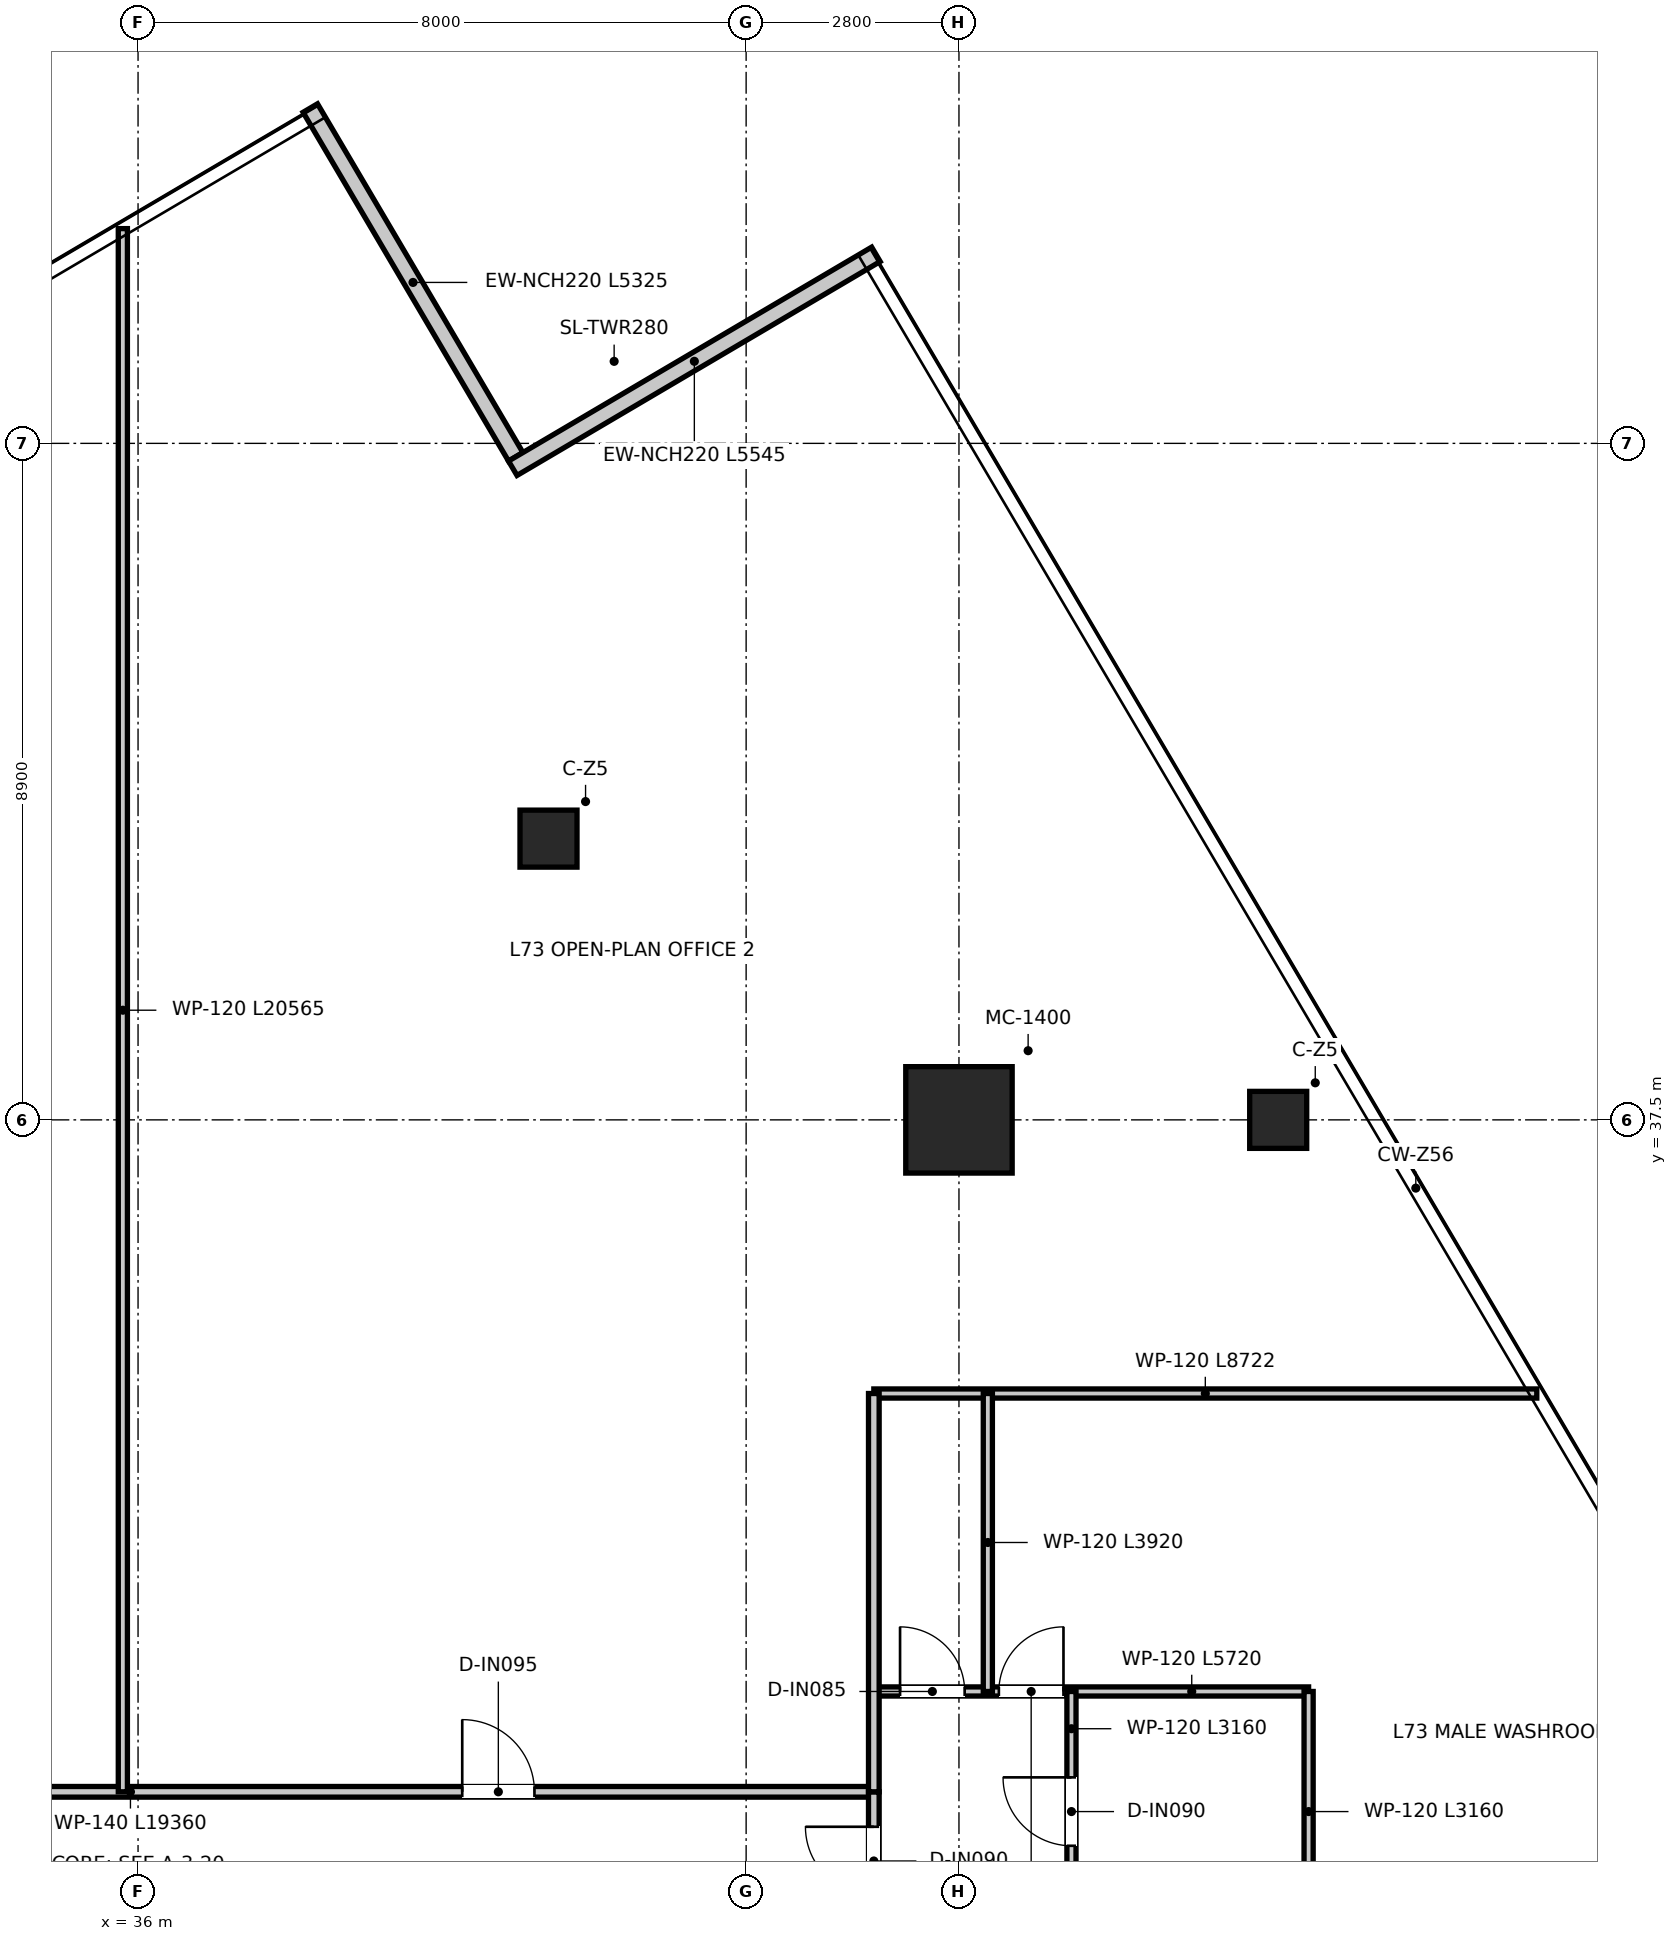
"""IFC4 building model, lengths in metres.
Left out: names, types, materials, properties, quantities, classifications, styles, units other than length and angle.
Written with IfcOpenShell. Run it as: python <this file> out.ifc"""

import sys

from ifc_helpers import new_model, si_unit, direction, frame, frame_2d, origin, origin_2d, place, context, subcontext, project, spatial, rectangle, extrude, source, transform, mapped, element, fill, save


model = new_model("IFC4")
c1 = context("Model", 3, precision=1e-05, world=origin(), true_north=direction((0.0, 1.0)))
c2 = subcontext(c1, "Body", "Model", "MODEL_VIEW")
j1 = project(units=[si_unit("LENGTHUNIT", "METRE"), si_unit("PLANEANGLEUNIT", "RADIAN")], contexts=[c1])
p1 = place(None, origin())
s1 = spatial("IfcSite", under=j1, at=p1, CompositionType="ELEMENT")
p2 = place(p1, origin())
s2 = spatial("IfcBuilding", under=s1, at=p2, CompositionType="ELEMENT")
p3 = place(p2, frame((0.0, 0.0, 299.0)))
s3 = spatial("IfcBuildingStorey", under=s2, at=p3, CompositionType="ELEMENT", Elevation=299.0)
m1 = source(origin(), c2, "Body", "SweptSolid", [
    extrude(rectangle(XDim=1.4, YDim=1.4, at=origin_2d()), origin(), (0.0, 0.0, 1.0), 3.95),
])
p4 = place(p3, frame((46.8, 37.5, 0.0), z_axis=(0.0, 0.0, 1.0), x_axis=(1.0, 0.0, 0.0)))
e1 = element("IfcColumn", 1, at=p4, inside=s3, PredefinedType="USERDEFINED", context=c2, shape_type="MappedRepresentation", body=[
    mapped(m1, transform((0.0, 0.0, 0.0), x_axis=(1.0, 0.0, 0.0), y_axis=(0.0, 1.0, 0.0), z_axis=(0.0, 0.0, 1.0), scale=1.0)),
])
m2 = source(origin(), c2, "Body", "SweptSolid", [
    extrude(rectangle(XDim=0.75, YDim=0.75, at=origin_2d()), origin(), (0.0, 0.0, 1.0), 3.95),
])
for number, where, z_axis, x_axis in (
    (2, (41.4, 41.2, 0.0), (0.0, 0.0, 1.0), (1.0, 0.0, 0.0)),
    (3, (51.0, 37.5, 0.0), (0.0, 0.0, 1.0), (1.0, 0.0, 0.0)),
):
    element("IfcColumn", number, at=place(p3, frame(where, z_axis=z_axis, x_axis=x_axis)), inside=s3, PredefinedType="COLUMN", context=c2, shape_type="MappedRepresentation", body=[
        mapped(m2, transform((0.0, 0.0, 0.0), x_axis=(1.0, 0.0, 0.0), y_axis=(0.0, 1.0, 0.0), z_axis=(0.0, 0.0, 1.0), scale=1.0)),
    ])
p5 = place(p3, frame((40.969, 46.223, 0.0), z_axis=(0.0, 0.0, 1.0), x_axis=(-0.507540984104, 0.861627616465, 0.0)))
e4 = element("IfcWall", 4, at=p5, inside=s3, PredefinedType="ELEMENTEDWALL", context=c2, shape_type="SweptSolid", body=[
    extrude(rectangle(XDim=5.325, YDim=0.22, at=frame_2d((2.663, 0.0))), origin(), (0.0, 0.0, 1.0), 3.67),
])
p6 = place(p3, frame((45.708, 48.887, 0.0), z_axis=(0.0, 0.0, 1.0), x_axis=(-0.861640923955, -0.507518391948, 0.0)))
e5 = element("IfcWall", 5, at=p6, inside=s3, PredefinedType="ELEMENTEDWALL", context=c2, shape_type="SweptSolid", body=[
    extrude(rectangle(XDim=5.545, YDim=0.22, at=frame_2d((2.772, 0.0))), origin(), (0.0, 0.0, 1.0), 3.67),
])
p7 = place(p3, frame((26.32, 28.66, 0.0), z_axis=(0.0, 0.0, 1.0), x_axis=(1.0, 0.0, 0.0)))
e6 = element("IfcWall", 6, at=p7, inside=s3, PredefinedType="PARTITIONING", context=c2, shape_type="SweptSolid", body=[
    extrude(rectangle(XDim=19.36, YDim=0.14, at=frame_2d((9.68, 0.0))), origin(), (0.0, 0.0, 1.0), 3.18),
])
p8 = place(p7, frame((4.265, 0.0, 0.0)))
e7 = element("IfcOpeningElement", 7, at=p8, cuts=e6, PredefinedType="OPENING", context=c2, shape_type="SweptSolid", body=[
    extrude(rectangle(XDim=0.95, YDim=2.1, at=frame_2d((0.475, 1.05))), frame((0.0, 0.08, 0.0), z_axis=(0.0, -1.0, 0.0), x_axis=(1.0, 0.0, 0.0)), (0.0, 0.0, 1.0), 0.16),
])
p9 = place(p7, frame((13.945, 0.0, 0.0)))
e8 = element("IfcOpeningElement", 8, at=p9, cuts=e6, PredefinedType="OPENING", context=c2, shape_type="SweptSolid", body=[
    extrude(rectangle(XDim=0.95, YDim=2.1, at=frame_2d((0.475, 1.05))), frame((0.0, 0.08, 0.0), z_axis=(0.0, -1.0, 0.0), x_axis=(1.0, 0.0, 0.0)), (0.0, 0.0, 1.0), 0.16),
])
p10 = place(p3, frame((45.68, 9.759, 0.0), z_axis=(0.0, 0.0, 1.0), x_axis=(0.0, 1.0, 0.0)))
e9 = element("IfcWall", 9, at=p10, inside=s3, PredefinedType="PARTITIONING", context=c2, shape_type="SweptSolid", body=[
    extrude(rectangle(XDim=18.901, YDim=0.14, at=frame_2d((9.451, 0.0))), origin(), (0.0, 0.0, 1.0), 3.13),
])
p11 = place(p10, frame((17.541, 0.0, 0.0)))
e10 = element("IfcOpeningElement", 10, at=p11, cuts=e9, PredefinedType="OPENING", context=c2, shape_type="SweptSolid", body=[
    extrude(rectangle(XDim=0.9, YDim=2.1, at=frame_2d((0.45, 1.05))), frame((0.0, 0.08, 0.0), z_axis=(0.0, -1.0, 0.0), x_axis=(1.0, 0.0, 0.0)), (0.0, 0.0, 1.0), 0.16),
])
p12 = place(p10, frame((9.291, 0.0, 0.0)))
e11 = element("IfcOpeningElement", 11, at=p12, cuts=e9, PredefinedType="OPENING", context=c2, shape_type="SweptSolid", body=[
    extrude(rectangle(XDim=0.9, YDim=2.1, at=frame_2d((0.45, 1.05))), frame((0.0, 0.08, 0.0), z_axis=(0.0, -1.0, 0.0), x_axis=(1.0, 0.0, 0.0)), (0.0, 0.0, 1.0), 0.16),
])
p13 = place(p10, frame((13.951, 0.0, 0.0)))
e12 = element("IfcOpeningElement", 12, at=p13, cuts=e9, PredefinedType="OPENING", context=c2, shape_type="SweptSolid", body=[
    extrude(rectangle(XDim=0.9, YDim=2.1, at=frame_2d((0.45, 1.05))), frame((0.0, 0.08, 0.0), z_axis=(0.0, -1.0, 0.0), x_axis=(1.0, 0.0, 0.0)), (0.0, 0.0, 1.0), 0.16),
])
p14 = place(p3, frame((45.68, 33.9, 0.0), z_axis=(0.0, 0.0, 1.0), x_axis=(1.0, 0.0, 0.0)))
e13 = element("IfcWall", 13, at=p14, inside=s3, PredefinedType="PARTITIONING", context=c2, shape_type="SweptSolid", body=[
    extrude(rectangle(XDim=8.722, YDim=0.12, at=frame_2d((4.361, 0.0))), origin(), (0.0, 0.0, 1.0), 3.13),
])
p15 = place(p3, frame((45.68, 29.98, 0.0), z_axis=(0.0, 0.0, 1.0), x_axis=(1.0, 0.0, 0.0)))
e14 = element("IfcWall", 14, at=p15, inside=s3, PredefinedType="PARTITIONING", context=c2, shape_type="SweptSolid", body=[
    extrude(rectangle(XDim=5.72, YDim=0.12, at=frame_2d((2.86, 0.0))), origin(), (0.0, 0.0, 1.0), 3.13),
])
p16 = place(p15, frame((1.645, 0.0, 0.0)))
e15 = element("IfcOpeningElement", 15, at=p16, cuts=e14, PredefinedType="OPENING", context=c2, shape_type="SweptSolid", body=[
    extrude(rectangle(XDim=0.85, YDim=2.1, at=frame_2d((0.425, 1.05))), frame((0.0, 0.07, 0.0), z_axis=(0.0, -1.0, 0.0), x_axis=(1.0, 0.0, 0.0)), (0.0, 0.0, 1.0), 0.14),
])
p17 = place(p15, frame((0.345, 0.0, 0.0)))
e16 = element("IfcOpeningElement", 16, at=p17, cuts=e14, PredefinedType="OPENING", context=c2, shape_type="SweptSolid", body=[
    extrude(rectangle(XDim=0.85, YDim=2.1, at=frame_2d((0.425, 1.05))), frame((0.0, 0.07, 0.0), z_axis=(0.0, -1.0, 0.0), x_axis=(1.0, 0.0, 0.0)), (0.0, 0.0, 1.0), 0.14),
])
p18 = place(p3, frame((51.4, 26.82, 0.0), z_axis=(0.0, 0.0, 1.0), x_axis=(0.0, 1.0, 0.0)))
e17 = element("IfcWall", 17, at=p18, inside=s3, PredefinedType="PARTITIONING", context=c2, shape_type="SweptSolid", body=[
    extrude(rectangle(XDim=3.16, YDim=0.12, at=frame_2d((1.58, 0.0))), origin(), (0.0, 0.0, 1.0), 3.67),
])
p19 = place(p3, frame((48.28, 26.82, 0.0), z_axis=(0.0, 0.0, 1.0), x_axis=(0.0, 1.0, 0.0)))
e18 = element("IfcWall", 18, at=p19, inside=s3, PredefinedType="PARTITIONING", context=c2, shape_type="SweptSolid", body=[
    extrude(rectangle(XDim=3.16, YDim=0.12, at=frame_2d((1.58, 0.0))), origin(), (0.0, 0.0, 1.0), 3.18),
])
p20 = place(p19, frame((1.13, 0.0, 0.0)))
e19 = element("IfcOpeningElement", 19, at=p20, cuts=e18, PredefinedType="OPENING", context=c2, shape_type="SweptSolid", body=[
    extrude(rectangle(XDim=0.9, YDim=2.1, at=frame_2d((0.45, 1.05))), frame((0.0, 0.07, 0.0), z_axis=(0.0, -1.0, 0.0), x_axis=(1.0, 0.0, 0.0)), (0.0, 0.0, 1.0), 0.14),
])
p21 = place(p3, frame((47.18, 29.98, 0.0), z_axis=(0.0, 0.0, 1.0), x_axis=(0.0, 1.0, 0.0)))
e20 = element("IfcWall", 20, at=p21, inside=s3, PredefinedType="PARTITIONING", context=c2, shape_type="SweptSolid", body=[
    extrude(rectangle(XDim=3.92, YDim=0.12, at=frame_2d((1.96, 0.0))), origin(), (0.0, 0.0, 1.0), 3.31),
])
p22 = place(p3, frame((45.68, 28.66, 0.0), z_axis=(0.0, 0.0, 1.0), x_axis=(0.0, 1.0, 0.0)))
e21 = element("IfcWall", 21, at=p22, inside=s3, PredefinedType="PARTITIONING", context=c2, shape_type="SweptSolid", body=[
    extrude(rectangle(XDim=5.24, YDim=0.14, at=frame_2d((2.62, 0.0))), origin(), (0.0, 0.0, 1.0), 3.43),
])
p23 = place(p3, frame((35.8, 28.66, 0.0), z_axis=(0.0, 0.0, 1.0), x_axis=(0.0, 1.0, 0.0)))
e22 = element("IfcWall", 22, at=p23, inside=s3, PredefinedType="PARTITIONING", context=c2, shape_type="SweptSolid", body=[
    extrude(rectangle(XDim=20.565, YDim=0.12, at=frame_2d((10.283, 0.0))), origin(), (0.0, 0.0, 1.0), 3.13),
])
p24 = place(p11, origin())
e23 = element("IfcDoor", 23, at=p24, inside=s3, OperationType="SINGLE_SWING_RIGHT", PredefinedType="DOOR", context=c2, shape_type="SweptSolid", body=[
    extrude(rectangle(XDim=0.9, YDim=2.1, at=frame_2d((0.45, 1.05))), frame((0.0, 0.025, 0.0), z_axis=(0.0, -1.0, 0.0), x_axis=(1.0, 0.0, 0.0)), (0.0, 0.0, 1.0), 0.05),
])
fill(e10, e23)
p25 = place(p16, origin())
e24 = element("IfcDoor", 24, at=p25, inside=s3, OperationType="SINGLE_SWING_RIGHT", PredefinedType="DOOR", context=c2, shape_type="SweptSolid", body=[
    extrude(rectangle(XDim=0.85, YDim=2.1, at=frame_2d((0.425, 1.05))), frame((0.0, 0.025, 0.0), z_axis=(0.0, -1.0, 0.0), x_axis=(1.0, 0.0, 0.0)), (0.0, 0.0, 1.0), 0.05),
])
fill(e15, e24)
p26 = place(p17, origin())
e25 = element("IfcDoor", 25, at=p26, inside=s3, OperationType="SINGLE_SWING_LEFT", PredefinedType="DOOR", context=c2, shape_type="SweptSolid", body=[
    extrude(rectangle(XDim=0.85, YDim=2.1, at=frame_2d((0.425, 1.05))), frame((0.0, 0.025, 0.0), z_axis=(0.0, -1.0, 0.0), x_axis=(1.0, 0.0, 0.0)), (0.0, 0.0, 1.0), 0.05),
])
fill(e16, e25)
p27 = place(p20, origin())
e26 = element("IfcDoor", 26, at=p27, inside=s3, OperationType="SINGLE_SWING_RIGHT", PredefinedType="DOOR", context=c2, shape_type="SweptSolid", body=[
    extrude(rectangle(XDim=0.9, YDim=2.1, at=frame_2d((0.45, 1.05))), frame((0.0, 0.025, 0.0), z_axis=(0.0, -1.0, 0.0), x_axis=(1.0, 0.0, 0.0)), (0.0, 0.0, 1.0), 0.05),
])
fill(e19, e26)
p28 = place(p9, origin())
e27 = element("IfcDoor", 27, at=p28, inside=s3, OperationType="SINGLE_SWING_LEFT", PredefinedType="DOOR", context=c2, shape_type="SweptSolid", body=[
    extrude(rectangle(XDim=0.95, YDim=2.1, at=frame_2d((0.475, 1.05))), frame((0.0, 0.025, 0.0), z_axis=(0.0, -1.0, 0.0), x_axis=(1.0, 0.0, 0.0)), (0.0, 0.0, 1.0), 0.05),
])
fill(e8, e27)
save(model, sys.argv[1])
